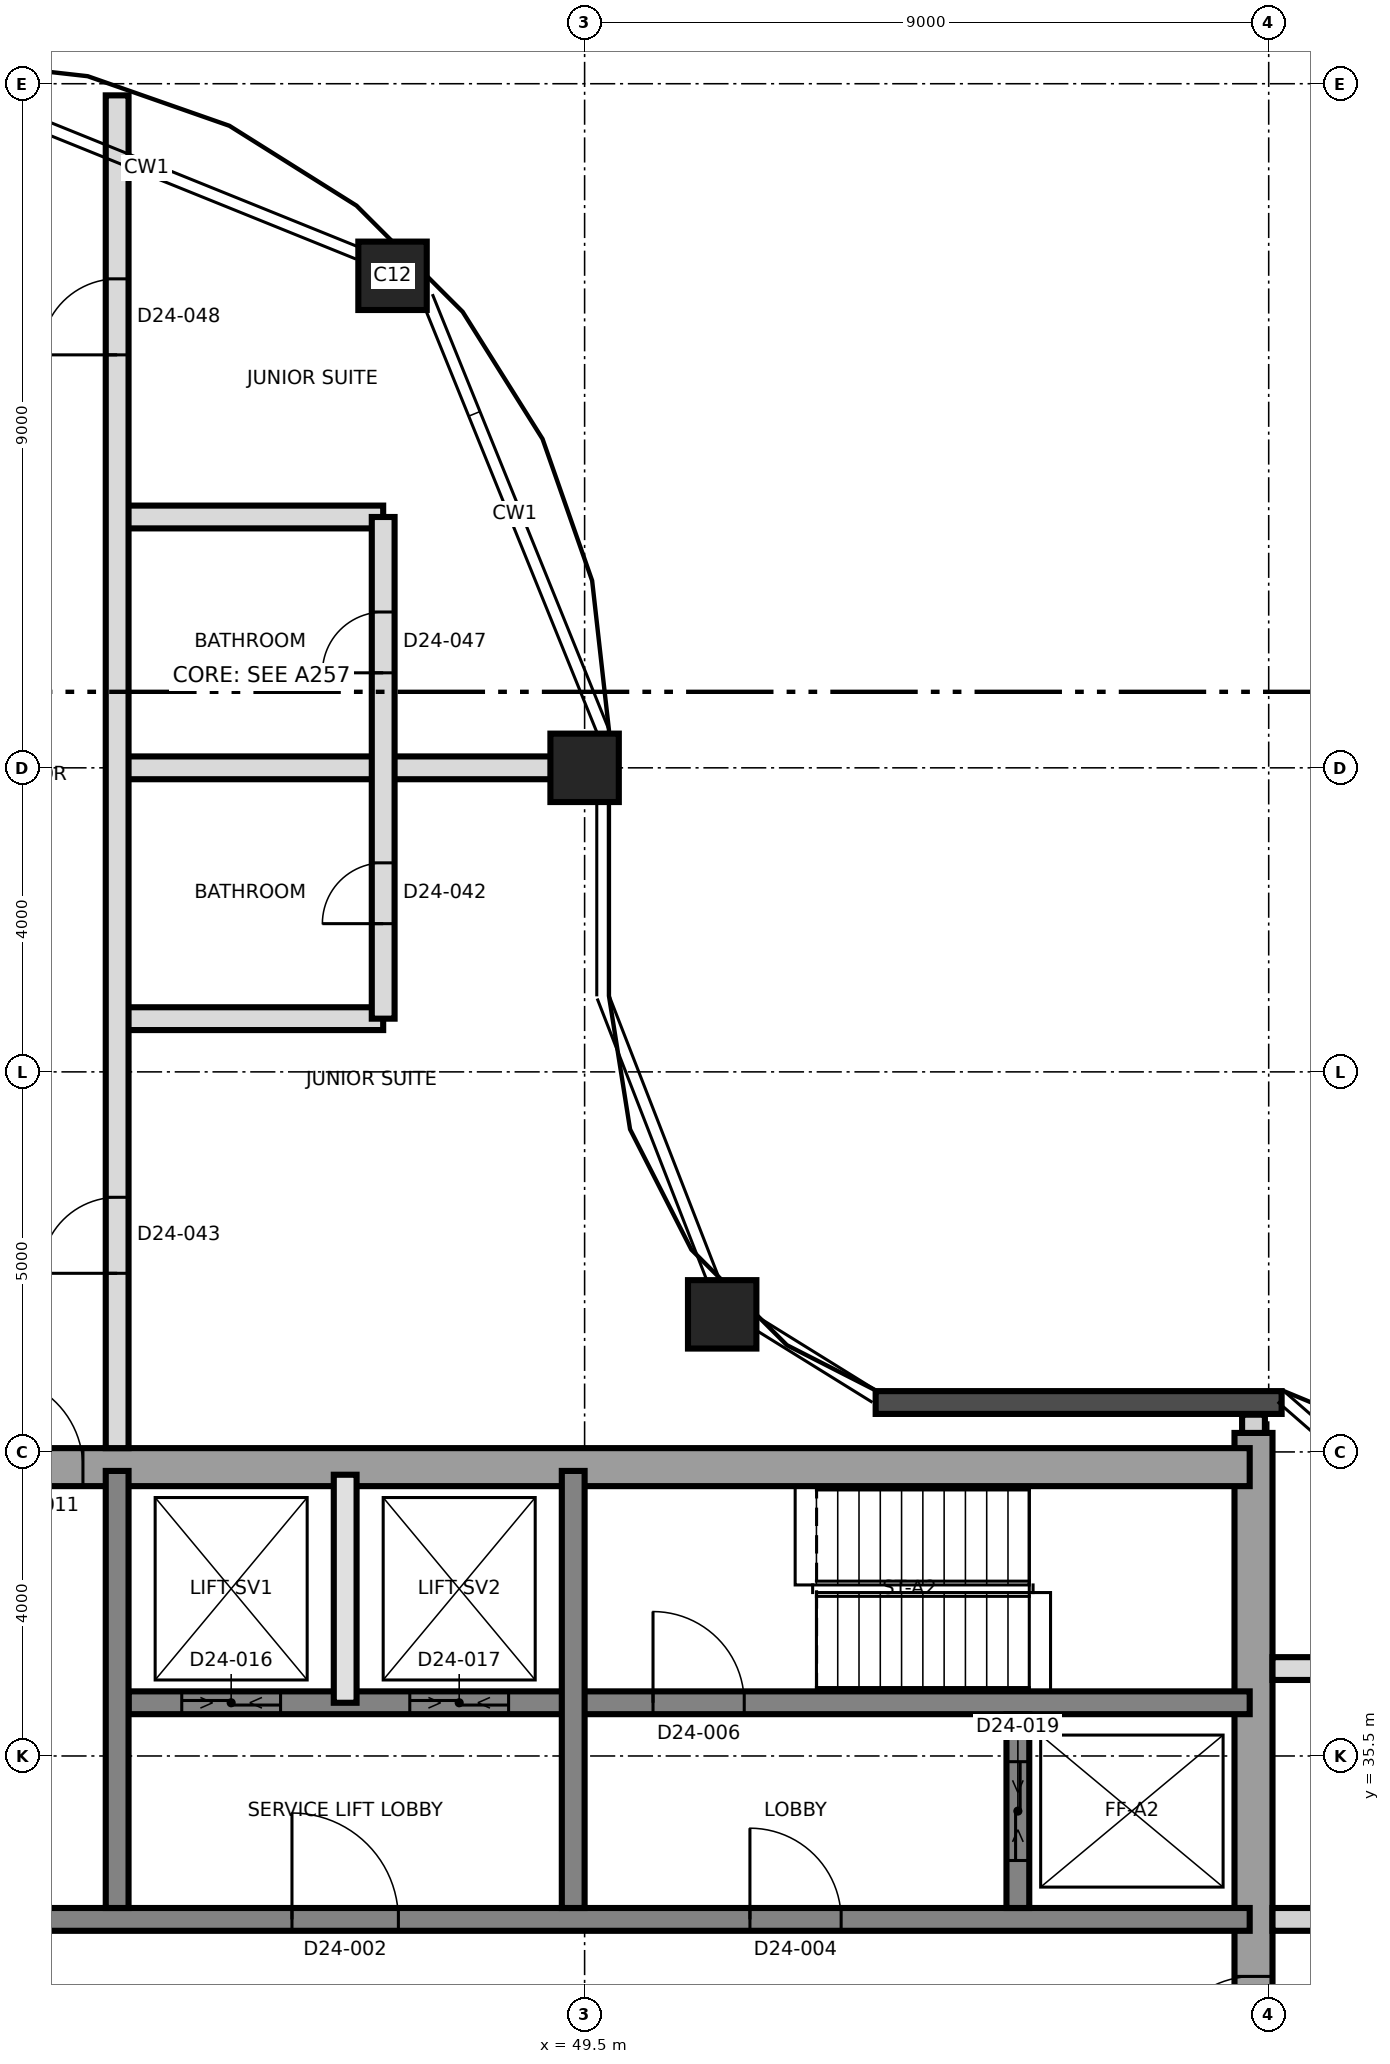
"""IFC4 building model, lengths in metres.
Left out: names, types, materials, properties, quantities, classifications, styles, units other than length and angle.
Written with IfcOpenShell. Run it as: python <this file> out.ifc"""

import sys

from ifc_helpers import new_model, si_unit, direction, frame, frame_2d, origin, origin_2d, place, context, subcontext, project, spatial, rectangle, extrude, element, fill, save


model = new_model("IFC4")
c1 = context("Model", 3, precision=1e-05, world=origin(), true_north=direction((0.0, 1.0)))
c2 = subcontext(c1, "Body", "Model", "MODEL_VIEW")
j1 = project(units=[si_unit("LENGTHUNIT", "METRE"), si_unit("PLANEANGLEUNIT", "RADIAN")], contexts=[c1])
p1 = place(None, origin())
s1 = spatial("IfcSite", under=j1, at=p1, CompositionType="ELEMENT")
p2 = place(p1, origin())
s2 = spatial("IfcBuilding", under=s1, at=p2, CompositionType="ELEMENT")
p3 = place(p2, frame((0.0, 0.0, 218.0)))
s3 = spatial("IfcBuildingStorey", under=s2, at=p3, CompositionType="ELEMENT", Elevation=218.0)
p4 = place(p3, frame((58.3, 21.25, 0.0), z_axis=(0.0, 0.0, 1.0), x_axis=(0.0, 1.0, 0.0)))
e1 = element("IfcWall", 1, at=p4, inside=s3, PredefinedType="SHEAR", context=c2, shape_type="SweptSolid", body=[
    extrude(rectangle(XDim=18.5, YDim=0.5, at=frame_2d((9.25, 0.0))), origin(), (0.0, 0.0, 1.0), 3.7),
])
p5 = place(p4, frame((10.15, 0.0, 0.0)))
e2 = element("IfcOpeningElement", 2, at=p5, cuts=e1, PredefinedType="OPENING", context=c2, shape_type="SweptSolid", body=[
    extrude(rectangle(XDim=1.2, YDim=2.1, at=frame_2d((0.6, 1.05))), frame((0.0, 0.26, 0.0), z_axis=(0.0, -1.0, 0.0), x_axis=(1.0, 0.0, 0.0)), (0.0, 0.0, 1.0), 0.52),
])
p6 = place(p3, frame((31.25, 39.3, 0.0), z_axis=(0.0, 0.0, 1.0), x_axis=(1.0, 0.0, 0.0)))
e3 = element("IfcWall", 3, at=p6, inside=s3, PredefinedType="SHEAR", context=c2, shape_type="SweptSolid", body=[
    extrude(rectangle(XDim=27.0, YDim=0.5, at=frame_2d((13.5, 0.0))), origin(), (0.0, 0.0, 1.0), 3.7),
])
p7 = place(p6, frame((10.45, 0.0, 0.0)))
e4 = element("IfcOpeningElement", 4, at=p7, cuts=e3, PredefinedType="OPENING", context=c2, shape_type="SweptSolid", body=[
    extrude(rectangle(XDim=1.2, YDim=2.1, at=frame_2d((0.6, 1.05))), frame((0.0, 0.26, 0.0), z_axis=(0.0, -1.0, 0.0), x_axis=(1.0, 0.0, 0.0)), (0.0, 0.0, 1.0), 0.52),
])
p8 = place(p3, frame((31.75, 33.35, 0.0), z_axis=(0.0, 0.0, 1.0), x_axis=(1.0, 0.0, 0.0)))
e5 = element("IfcWall", 5, at=p8, inside=s3, PredefinedType="SHEAR", context=c2, shape_type="SweptSolid", body=[
    extrude(rectangle(XDim=26.5, YDim=0.3, at=frame_2d((13.25, 0.0))), origin(), (0.0, 0.0, 1.0), 3.7),
])
p9 = place(p8, frame((13.9, 0.0, 0.0)))
e6 = element("IfcOpeningElement", 6, at=p9, cuts=e5, PredefinedType="OPENING", context=c2, shape_type="SweptSolid", body=[
    extrude(rectangle(XDim=1.4, YDim=2.1, at=frame_2d((0.7, 1.05))), frame((0.0, 0.16, 0.0), z_axis=(0.0, -1.0, 0.0), x_axis=(1.0, 0.0, 0.0)), (0.0, 0.0, 1.0), 0.32),
])
p10 = place(p8, frame((5.375, 0.0, 0.0)))
e7 = element("IfcOpeningElement", 7, at=p10, cuts=e5, PredefinedType="OPENING", context=c2, shape_type="SweptSolid", body=[
    extrude(rectangle(XDim=1.2, YDim=2.1, at=frame_2d((0.6, 1.05))), frame((0.0, 0.16, 0.0), z_axis=(0.0, -1.0, 0.0), x_axis=(1.0, 0.0, 0.0)), (0.0, 0.0, 1.0), 0.32),
])
p11 = place(p8, frame((19.925, 0.0, 0.0)))
e8 = element("IfcOpeningElement", 8, at=p11, cuts=e5, PredefinedType="OPENING", context=c2, shape_type="SweptSolid", body=[
    extrude(rectangle(XDim=1.2, YDim=2.1, at=frame_2d((0.6, 1.05))), frame((0.0, 0.16, 0.0), z_axis=(0.0, -1.0, 0.0), x_axis=(1.0, 0.0, 0.0)), (0.0, 0.0, 1.0), 0.32),
])
p12 = place(p3, frame((43.5, 36.2, 0.0), z_axis=(0.0, 0.0, 1.0), x_axis=(1.0, 0.0, 0.0)))
e9 = element("IfcWall", 9, at=p12, inside=s3, PredefinedType="SHEAR", context=c2, shape_type="SweptSolid", body=[
    extrude(rectangle(XDim=14.75, YDim=0.3, at=frame_2d((7.375, 0.0))), origin(), (0.0, 0.0, 1.0), 3.7),
])
p13 = place(p12, frame((6.9, 0.0, 0.0)))
e10 = element("IfcOpeningElement", 10, at=p13, cuts=e9, PredefinedType="OPENING", context=c2, shape_type="SweptSolid", body=[
    extrude(rectangle(XDim=1.2, YDim=2.1, at=frame_2d((0.6, 1.05))), frame((0.0, 0.16, 0.0), z_axis=(0.0, -1.0, 0.0), x_axis=(1.0, 0.0, 0.0)), (0.0, 0.0, 1.0), 0.32),
])
p14 = place(p12, frame((0.7, 0.0, 0.0)))
e11 = element("IfcOpeningElement", 11, at=p14, cuts=e9, PredefinedType="OPENING", context=c2, shape_type="SweptSolid", body=[
    extrude(rectangle(XDim=1.3, YDim=2.4, at=frame_2d((0.65, 1.2))), frame((0.0, 0.16, 0.0), z_axis=(0.0, -1.0, 0.0), x_axis=(1.0, 0.0, 0.0)), (0.0, 0.0, 1.0), 0.32),
])
p15 = place(p12, frame((3.7, 0.0, 0.0)))
e12 = element("IfcOpeningElement", 12, at=p15, cuts=e9, PredefinedType="OPENING", context=c2, shape_type="SweptSolid", body=[
    extrude(rectangle(XDim=1.3, YDim=2.4, at=frame_2d((0.65, 1.2))), frame((0.0, 0.16, 0.0), z_axis=(0.0, -1.0, 0.0), x_axis=(1.0, 0.0, 0.0)), (0.0, 0.0, 1.0), 0.32),
])
for number, where, z_axis, x_axis in (
    (13, (43.35, 33.5, 0.0), (0.0, 0.0, 1.0), (0.0, 1.0, 0.0)),
    (14, (49.35, 33.5, 0.0), (0.0, 0.0, 1.0), (0.0, 1.0, 0.0)),
):
    element("IfcWall", number, at=place(p3, frame(where, z_axis=z_axis, x_axis=x_axis)), inside=s3, PredefinedType="SHEAR", context=c2, shape_type="SweptSolid", body=[
        extrude(rectangle(XDim=5.75, YDim=0.3, at=frame_2d((2.875, 0.0))), origin(), (0.0, 0.0, 1.0), 3.7),
    ])
p16 = place(p3, frame((55.2, 33.5, 0.0), z_axis=(0.0, 0.0, 1.0), x_axis=(0.0, 1.0, 0.0)))
e15 = element("IfcWall", 15, at=p16, inside=s3, PredefinedType="SHEAR", context=c2, shape_type="SweptSolid", body=[
    extrude(rectangle(XDim=2.55, YDim=0.3, at=frame_2d((1.275, 0.0))), origin(), (0.0, 0.0, 1.0), 3.7),
])
p17 = place(p16, frame((0.625, 0.0, 0.0)))
e16 = element("IfcOpeningElement", 16, at=p17, cuts=e15, PredefinedType="OPENING", context=c2, shape_type="SweptSolid", body=[
    extrude(rectangle(XDim=1.3, YDim=2.4, at=frame_2d((0.65, 1.2))), frame((0.0, 0.16, 0.0), z_axis=(0.0, -1.0, 0.0), x_axis=(1.0, 0.0, 0.0)), (0.0, 0.0, 1.0), 0.32),
])
for number, where, z_axis, x_axis in (
    (17, (51.31, 41.31, 0.0), (0.0, 0.0, 1.0), (1.0, 0.0, 0.0)),
    (18, (49.5, 48.5, 0.0), (0.0, 0.0, 1.0), (1.0, 0.0, 0.0)),
    (19, (46.973, 54.973, 0.0), (0.0, 0.0, 1.0), (1.0, 0.0, 0.0)),
):
    element("IfcColumn", number, at=place(p3, frame(where, z_axis=z_axis, x_axis=x_axis)), inside=s3, PredefinedType="COLUMN", context=c2, shape_type="SweptSolid", body=[
        extrude(rectangle(XDim=0.9, YDim=0.9, at=origin_2d()), origin(), (0.0, 0.0, 1.0), 3.7),
    ])
p18 = place(p3, frame((58.67, 40.15, 0.0), z_axis=(0.0, 0.0, 1.0), x_axis=(-1.0, 0.0, 0.0)))
e20 = element("IfcWall", 20, at=p18, inside=s3, PredefinedType="SOLIDWALL", context=c2, shape_type="SweptSolid", body=[
    extrude(rectangle(XDim=5.341, YDim=0.3, at=frame_2d((2.67, 0.0))), origin(), (0.0, 0.0, 1.0), 3.4),
])
p19 = place(p3, frame((46.35, 36.2, 0.0), z_axis=(0.0, 0.0, 1.0), x_axis=(0.0, 1.0, 0.0)))
e21 = element("IfcWall", 21, at=p19, inside=s3, PredefinedType="SOLIDWALL", context=c2, shape_type="SweptSolid", body=[
    extrude(rectangle(XDim=3.0, YDim=0.3, at=frame_2d((1.5, 0.0))), origin(), (0.0, 0.0, 1.0), 3.4),
])
p20 = place(p3, frame((58.55, 33.35, 0.0), z_axis=(0.0, 0.0, 1.0), x_axis=(1.0, 0.0, 0.0)))
e22 = element("IfcWall", 22, at=p20, inside=s3, PredefinedType="PARTITIONING", context=c2, shape_type="SweptSolid", body=[
    extrude(rectangle(XDim=26.78, YDim=0.3, at=frame_2d((13.39, 0.0))), origin(), (0.0, 0.0, 1.0), 3.4),
])
p21 = place(p20, frame((3.95, 0.0, 0.0)))
e23 = element("IfcOpeningElement", 23, at=p21, cuts=e22, PredefinedType="OPENING", context=c2, shape_type="SweptSolid", body=[
    extrude(rectangle(XDim=1.0, YDim=2.4, at=frame_2d((0.5, 1.2))), frame((0.0, 0.16, 0.0), z_axis=(0.0, -1.0, 0.0), x_axis=(1.0, 0.0, 0.0)), (0.0, 0.0, 1.0), 0.32),
])
p22 = place(p20, frame((12.05, 0.0, 0.0)))
e24 = element("IfcOpeningElement", 24, at=p22, cuts=e22, PredefinedType="OPENING", context=c2, shape_type="SweptSolid", body=[
    extrude(rectangle(XDim=1.0, YDim=2.1, at=frame_2d((0.5, 1.05))), frame((0.0, 0.16, 0.0), z_axis=(0.0, -1.0, 0.0), x_axis=(1.0, 0.0, 0.0)), (0.0, 0.0, 1.0), 0.32),
])
p23 = place(p20, frame((13.85, 0.0, 0.0)))
e25 = element("IfcOpeningElement", 25, at=p23, cuts=e22, PredefinedType="OPENING", context=c2, shape_type="SweptSolid", body=[
    extrude(rectangle(XDim=1.0, YDim=2.1, at=frame_2d((0.5, 1.05))), frame((0.0, 0.16, 0.0), z_axis=(0.0, -1.0, 0.0), x_axis=(1.0, 0.0, 0.0)), (0.0, 0.0, 1.0), 0.32),
])
p24 = place(p20, frame((20.3, 0.0, 0.0)))
e26 = element("IfcOpeningElement", 26, at=p24, cuts=e22, PredefinedType="OPENING", context=c2, shape_type="SweptSolid", body=[
    extrude(rectangle(XDim=1.0, YDim=2.4, at=frame_2d((0.5, 1.2))), frame((0.0, 0.16, 0.0), z_axis=(0.0, -1.0, 0.0), x_axis=(1.0, 0.0, 0.0)), (0.0, 0.0, 1.0), 0.32),
])
p25 = place(p3, frame((58.55, 36.65, 0.0), z_axis=(0.0, 0.0, 1.0), x_axis=(1.0, 0.0, 0.0)))
e27 = element("IfcWall", 27, at=p25, inside=s3, PredefinedType="PARTITIONING", context=c2, shape_type="SweptSolid", body=[
    extrude(rectangle(XDim=2.95, YDim=0.3, at=frame_2d((1.475, 0.0))), origin(), (0.0, 0.0, 1.0), 3.4),
])
p26 = place(p25, frame((1.05, 0.0, 0.0)))
e28 = element("IfcOpeningElement", 28, at=p26, cuts=e27, PredefinedType="OPENING", context=c2, shape_type="SweptSolid", body=[
    extrude(rectangle(XDim=0.8, YDim=2.1, at=frame_2d((0.4, 1.05))), frame((0.0, 0.16, 0.0), z_axis=(0.0, -1.0, 0.0), x_axis=(1.0, 0.0, 0.0)), (0.0, 0.0, 1.0), 0.32),
])
p27 = place(p3, frame((43.35, 45.2, 0.0), z_axis=(0.0, 0.0, 1.0), x_axis=(1.0, 0.0, 0.0)))
e29 = element("IfcWall", 29, at=p27, inside=s3, PredefinedType="PARTITIONING", context=c2, shape_type="SweptSolid", body=[
    extrude(rectangle(XDim=3.5, YDim=0.3, at=frame_2d((1.75, 0.0))), origin(), (0.0, 0.0, 1.0), 3.4),
])
p28 = place(p3, frame((43.35, 48.5, 0.0), z_axis=(0.0, 0.0, 1.0), x_axis=(1.0, 0.0, 0.0)))
e30 = element("IfcWall", 30, at=p28, inside=s3, PredefinedType="PARTITIONING", context=c2, shape_type="SweptSolid", body=[
    extrude(rectangle(XDim=6.12, YDim=0.3, at=frame_2d((3.06, 0.0))), origin(), (0.0, 0.0, 1.0), 3.4),
])
p29 = place(p3, frame((43.35, 51.8, 0.0), z_axis=(0.0, 0.0, 1.0), x_axis=(1.0, 0.0, 0.0)))
e31 = element("IfcWall", 31, at=p29, inside=s3, PredefinedType="PARTITIONING", context=c2, shape_type="SweptSolid", body=[
    extrude(rectangle(XDim=3.5, YDim=0.3, at=frame_2d((1.75, 0.0))), origin(), (0.0, 0.0, 1.0), 3.4),
])
p30 = place(p3, frame((43.35, 39.55, 0.0), z_axis=(0.0, 0.0, 1.0), x_axis=(0.0, 1.0, 0.0)))
e32 = element("IfcWall", 32, at=p30, inside=s3, PredefinedType="PARTITIONING", context=c2, shape_type="SweptSolid", body=[
    extrude(rectangle(XDim=17.797, YDim=0.3, at=frame_2d((8.898, 0.0))), origin(), (0.0, 0.0, 1.0), 3.4),
])
p31 = place(p30, frame((2.3, 0.0, 0.0)))
e33 = element("IfcOpeningElement", 33, at=p31, cuts=e32, PredefinedType="OPENING", context=c2, shape_type="SweptSolid", body=[
    extrude(rectangle(XDim=1.0, YDim=2.4, at=frame_2d((0.5, 1.2))), frame((0.0, 0.16, 0.0), z_axis=(0.0, -1.0, 0.0), x_axis=(1.0, 0.0, 0.0)), (0.0, 0.0, 1.0), 0.32),
])
p32 = place(p30, frame((14.383, 0.0, 0.0)))
e34 = element("IfcOpeningElement", 34, at=p32, cuts=e32, PredefinedType="OPENING", context=c2, shape_type="SweptSolid", body=[
    extrude(rectangle(XDim=1.0, YDim=2.4, at=frame_2d((0.5, 1.2))), frame((0.0, 0.16, 0.0), z_axis=(0.0, -1.0, 0.0), x_axis=(1.0, 0.0, 0.0)), (0.0, 0.0, 1.0), 0.32),
])
p33 = place(p3, frame((46.85, 45.2, 0.0), z_axis=(0.0, 0.0, 1.0), x_axis=(0.0, 1.0, 0.0)))
e35 = element("IfcWall", 35, at=p33, inside=s3, PredefinedType="PARTITIONING", context=c2, shape_type="SweptSolid", body=[
    extrude(rectangle(XDim=6.6, YDim=0.3, at=frame_2d((3.3, 0.0))), origin(), (0.0, 0.0, 1.0), 3.4),
])
p34 = place(p33, frame((1.25, 0.0, 0.0)))
e36 = element("IfcOpeningElement", 36, at=p34, cuts=e35, PredefinedType="OPENING", context=c2, shape_type="SweptSolid", body=[
    extrude(rectangle(XDim=0.8, YDim=2.1, at=frame_2d((0.4, 1.05))), frame((0.0, 0.16, 0.0), z_axis=(0.0, -1.0, 0.0), x_axis=(1.0, 0.0, 0.0)), (0.0, 0.0, 1.0), 0.32),
])
p35 = place(p33, frame((4.55, 0.0, 0.0)))
e37 = element("IfcOpeningElement", 37, at=p35, cuts=e35, PredefinedType="OPENING", context=c2, shape_type="SweptSolid", body=[
    extrude(rectangle(XDim=0.8, YDim=2.1, at=frame_2d((0.4, 1.05))), frame((0.0, 0.16, 0.0), z_axis=(0.0, -1.0, 0.0), x_axis=(1.0, 0.0, 0.0)), (0.0, 0.0, 1.0), 0.32),
])
p36 = place(p3, frame((58.3, 39.75, 0.0), z_axis=(0.0, 0.0, 1.0), x_axis=(0.0, 1.0, 0.0)))
e38 = element("IfcWall", 38, at=p36, inside=s3, PredefinedType="PARTITIONING", context=c2, shape_type="SweptSolid", body=[
    extrude(rectangle(XDim=0.24, YDim=0.3, at=frame_2d((0.12, 0.0))), origin(), (0.0, 0.0, 1.0), 3.4),
])
p37 = place(p9, origin())
e39 = element("IfcDoor", 39, at=p37, inside=s3, OperationType="SINGLE_SWING_RIGHT", PredefinedType="DOOR", context=c2, shape_type="SweptSolid", body=[
    extrude(rectangle(XDim=1.4, YDim=2.1, at=frame_2d((0.7, 1.05))), frame((0.0, 0.025, 0.0), z_axis=(0.0, -1.0, 0.0), x_axis=(1.0, 0.0, 0.0)), (0.0, 0.0, 1.0), 0.05),
])
fill(e6, e39)
p38 = place(p11, origin())
e40 = element("IfcDoor", 40, at=p38, inside=s3, OperationType="SINGLE_SWING_RIGHT", PredefinedType="DOOR", context=c2, shape_type="SweptSolid", body=[
    extrude(rectangle(XDim=1.2, YDim=2.1, at=frame_2d((0.6, 1.05))), frame((0.0, 0.025, 0.0), z_axis=(0.0, -1.0, 0.0), x_axis=(1.0, 0.0, 0.0)), (0.0, 0.0, 1.0), 0.05),
])
fill(e8, e40)
p39 = place(p13, origin())
e41 = element("IfcDoor", 41, at=p39, inside=s3, OperationType="SINGLE_SWING_LEFT", PredefinedType="DOOR", context=c2, shape_type="SweptSolid", body=[
    extrude(rectangle(XDim=1.2, YDim=2.1, at=frame_2d((0.6, 1.05))), frame((0.0, 0.025, 0.0), z_axis=(0.0, -1.0, 0.0), x_axis=(1.0, 0.0, 0.0)), (0.0, 0.0, 1.0), 0.05),
])
fill(e10, e41)
p40 = place(p5, origin())
e42 = element("IfcDoor", 42, at=p40, inside=s3, OperationType="SINGLE_SWING_LEFT", PredefinedType="DOOR", context=c2, shape_type="SweptSolid", body=[
    extrude(rectangle(XDim=1.2, YDim=2.1, at=frame_2d((0.6, 1.05))), frame((0.0, 0.025, 0.0), z_axis=(0.0, -1.0, 0.0), x_axis=(1.0, 0.0, 0.0)), (0.0, 0.0, 1.0), 0.05),
])
fill(e2, e42)
p41 = place(p7, origin())
e43 = element("IfcDoor", 43, at=p41, inside=s3, OperationType="SINGLE_SWING_RIGHT", PredefinedType="DOOR", context=c2, shape_type="SweptSolid", body=[
    extrude(rectangle(XDim=1.2, YDim=2.1, at=frame_2d((0.6, 1.05))), frame((0.0, 0.025, 0.0), z_axis=(0.0, -1.0, 0.0), x_axis=(1.0, 0.0, 0.0)), (0.0, 0.0, 1.0), 0.05),
])
fill(e4, e43)
p42 = place(p14, origin())
e44 = element("IfcDoor", 44, at=p42, inside=s3, OperationType="SLIDING_TO_LEFT", PredefinedType="DOOR", context=c2, shape_type="SweptSolid", body=[
    extrude(rectangle(XDim=1.3, YDim=2.4, at=frame_2d((0.65, 1.2))), frame((0.0, 0.025, 0.0), z_axis=(0.0, -1.0, 0.0), x_axis=(1.0, 0.0, 0.0)), (0.0, 0.0, 1.0), 0.05),
])
fill(e11, e44)
p43 = place(p15, origin())
e45 = element("IfcDoor", 45, at=p43, inside=s3, OperationType="SLIDING_TO_LEFT", PredefinedType="DOOR", context=c2, shape_type="SweptSolid", body=[
    extrude(rectangle(XDim=1.3, YDim=2.4, at=frame_2d((0.65, 1.2))), frame((0.0, 0.025, 0.0), z_axis=(0.0, -1.0, 0.0), x_axis=(1.0, 0.0, 0.0)), (0.0, 0.0, 1.0), 0.05),
])
fill(e12, e45)
p44 = place(p17, origin())
e46 = element("IfcDoor", 46, at=p44, inside=s3, OperationType="SLIDING_TO_LEFT", PredefinedType="DOOR", context=c2, shape_type="SweptSolid", body=[
    extrude(rectangle(XDim=1.3, YDim=2.4, at=frame_2d((0.65, 1.2))), frame((0.0, 0.025, 0.0), z_axis=(0.0, -1.0, 0.0), x_axis=(1.0, 0.0, 0.0)), (0.0, 0.0, 1.0), 0.05),
])
fill(e16, e46)
p45 = place(p34, origin())
e47 = element("IfcDoor", 47, at=p45, inside=s3, OperationType="SINGLE_SWING_LEFT", PredefinedType="DOOR", context=c2, shape_type="SweptSolid", body=[
    extrude(rectangle(XDim=0.8, YDim=2.1, at=frame_2d((0.4, 1.05))), frame((0.0, 0.025, 0.0), z_axis=(0.0, -1.0, 0.0), x_axis=(1.0, 0.0, 0.0)), (0.0, 0.0, 1.0), 0.05),
])
fill(e36, e47)
p46 = place(p31, origin())
e48 = element("IfcDoor", 48, at=p46, inside=s3, OperationType="SINGLE_SWING_RIGHT", PredefinedType="DOOR", context=c2, shape_type="SweptSolid", body=[
    extrude(rectangle(XDim=1.0, YDim=2.4, at=frame_2d((0.5, 1.2))), frame((0.0, 0.025, 0.0), z_axis=(0.0, -1.0, 0.0), x_axis=(1.0, 0.0, 0.0)), (0.0, 0.0, 1.0), 0.05),
])
fill(e33, e48)
p47 = place(p35, origin())
e49 = element("IfcDoor", 49, at=p47, inside=s3, OperationType="SINGLE_SWING_RIGHT", PredefinedType="DOOR", context=c2, shape_type="SweptSolid", body=[
    extrude(rectangle(XDim=0.8, YDim=2.1, at=frame_2d((0.4, 1.05))), frame((0.0, 0.025, 0.0), z_axis=(0.0, -1.0, 0.0), x_axis=(1.0, 0.0, 0.0)), (0.0, 0.0, 1.0), 0.05),
])
fill(e37, e49)
p48 = place(p32, origin())
e50 = element("IfcDoor", 50, at=p48, inside=s3, OperationType="SINGLE_SWING_LEFT", PredefinedType="DOOR", context=c2, shape_type="SweptSolid", body=[
    extrude(rectangle(XDim=1.0, YDim=2.4, at=frame_2d((0.5, 1.2))), frame((0.0, 0.025, 0.0), z_axis=(0.0, -1.0, 0.0), x_axis=(1.0, 0.0, 0.0)), (0.0, 0.0, 1.0), 0.05),
])
fill(e34, e50)
save(model, sys.argv[1])
